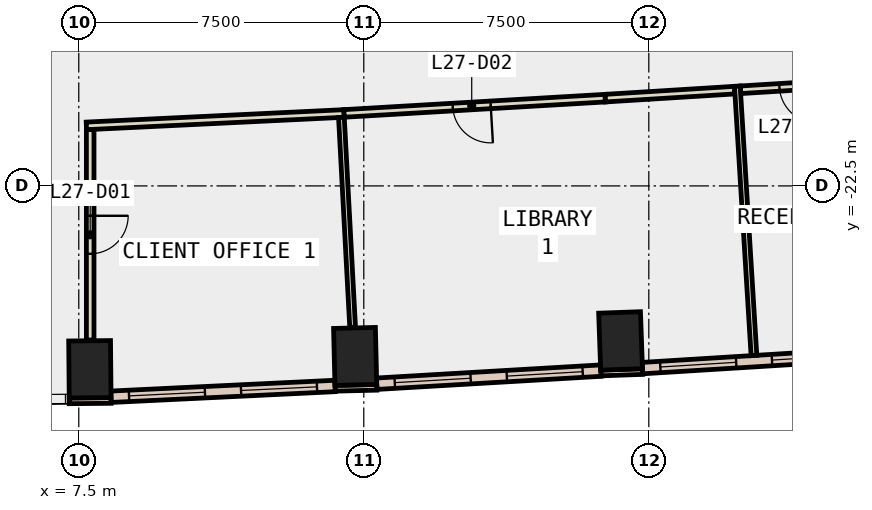
"""IFC4 building model, lengths in metres.
Left out: names, types, materials, properties, quantities, classifications, styles, units other than length and angle.
Written with IfcOpenShell. Run it as: python <this file> out.ifc"""

import sys

from ifc_helpers import new_model, si_unit, direction, frame, frame_2d, origin, origin_2d, place, context, subcontext, project, spatial, rectangle, extrude, element, fill, save


model = new_model("IFC4")
c1 = context("Model", 3, precision=1e-05, world=origin(), true_north=direction((0.0, 1.0)))
c2 = subcontext(c1, "Body", "Model", "MODEL_VIEW")
j1 = project(units=[si_unit("LENGTHUNIT", "METRE"), si_unit("PLANEANGLEUNIT", "RADIAN")], contexts=[c1])
p1 = place(None, origin())
s1 = spatial("IfcSite", under=j1, at=p1, CompositionType="ELEMENT")
p2 = place(p1, origin())
s2 = spatial("IfcBuilding", under=s1, at=p2, CompositionType="ELEMENT")
p3 = place(p2, frame((0.0, 0.0, 124.4)))
s3 = spatial("IfcBuildingStorey", under=s2, at=p3, CompositionType="ELEMENT", Elevation=124.4)
for number, where, z_axis, x_axis in (
    (1, (7.792, -27.325, -0.4), (0.0, 0.0, 1.0), (1.0, 0.009, 0.0)),
    (2, (14.773, -26.987, -0.4), (0.0, 0.0, 1.0), (1.0, 0.024, 0.0)),
    (3, (21.757, -26.579, -0.4), (0.0, 0.0, 1.0), (0.999, 0.035, 0.0)),
):
    element("IfcColumn", number, at=place(p3, frame(where, z_axis=z_axis, x_axis=x_axis)), inside=s3, PredefinedType="COLUMN", context=c2, shape_type="SweptSolid", body=[
        extrude(rectangle(XDim=1.1, YDim=1.5, at=origin_2d()), origin(), (0.0, 0.0, 1.0), 4.2),
    ])
p4 = place(p3, frame((7.249, -28.155, 0.0), z_axis=(0.0, 0.0, 1.0), x_axis=(0.99995860686, 0.009098602504, 0.0)))
e4 = element("IfcWall", 4, at=p4, inside=s3, PredefinedType="STANDARD", context=c2, shape_type="SweptSolid", body=[
    extrude(rectangle(XDim=1.1, YDim=0.15, at=frame_2d((0.55, 0.0))), origin(), (0.0, 0.0, 1.0), 3.8),
])
p5 = place(p3, frame((14.243, -27.825, 0.0), z_axis=(0.0, 0.0, 1.0), x_axis=(0.999723421029, 0.023517683673, 0.0)))
e5 = element("IfcWall", 5, at=p5, inside=s3, PredefinedType="STANDARD", context=c2, shape_type="SweptSolid", body=[
    extrude(rectangle(XDim=1.1, YDim=0.15, at=frame_2d((0.55, 0.0))), origin(), (0.0, 0.0, 1.0), 3.8),
])
p6 = place(p3, frame((21.237, -27.423, 0.0), z_axis=(0.0, 0.0, 1.0), x_axis=(0.999368780235, 0.035525217693, 0.0)))
e6 = element("IfcWall", 6, at=p6, inside=s3, PredefinedType="STANDARD", context=c2, shape_type="SweptSolid", body=[
    extrude(rectangle(XDim=1.1, YDim=0.15, at=frame_2d((0.55, 0.0))), origin(), (0.0, 0.0, 1.0), 3.8),
])
p7 = place(p3, frame((8.347, -28.048, 0.0), z_axis=(0.0, 0.0, 1.0), x_axis=(0.998840459798, 0.048142869367, 0.0)))
e7 = element("IfcWall", 7, at=p7, inside=s3, PredefinedType="STANDARD", context=c2, shape_type="SweptSolid", body=[
    extrude(rectangle(XDim=5.903, YDim=0.3, at=frame_2d((2.951, 0.0))), origin(), (0.0, 0.0, 1.0), 3.8),
])
p8 = place(p7, frame((0.476, 0.0, 0.9)))
e8 = element("IfcOpeningElement", 8, at=p8, cuts=e7, PredefinedType="OPENING", context=c2, shape_type="SweptSolid", body=[
    extrude(rectangle(XDim=2.0, YDim=2.6, at=frame_2d((1.0, 1.3))), frame((0.0, 0.16, 0.0), z_axis=(0.0, -1.0, 0.0), x_axis=(1.0, 0.0, 0.0)), (0.0, 0.0, 1.0), 0.32),
])
p9 = place(p7, frame((3.427, 0.0, 0.9)))
e9 = element("IfcOpeningElement", 9, at=p9, cuts=e7, PredefinedType="OPENING", context=c2, shape_type="SweptSolid", body=[
    extrude(rectangle(XDim=2.0, YDim=2.6, at=frame_2d((1.0, 1.3))), frame((0.0, 0.16, 0.0), z_axis=(0.0, -1.0, 0.0), x_axis=(1.0, 0.0, 0.0)), (0.0, 0.0, 1.0), 0.32),
])
p10 = place(p3, frame((15.34, -27.705, 0.0), z_axis=(0.0, 0.0, 1.0), x_axis=(0.998292147894, 0.058419067546, 0.0)))
e10 = element("IfcWall", 10, at=p10, inside=s3, PredefinedType="STANDARD", context=c2, shape_type="SweptSolid", body=[
    extrude(rectangle(XDim=5.905, YDim=0.3, at=frame_2d((2.953, 0.0))), origin(), (0.0, 0.0, 1.0), 3.8),
])
p11 = place(p10, frame((0.476, 0.0, 0.9)))
e11 = element("IfcOpeningElement", 11, at=p11, cuts=e10, PredefinedType="OPENING", context=c2, shape_type="SweptSolid", body=[
    extrude(rectangle(XDim=2.0, YDim=2.6, at=frame_2d((1.0, 1.3))), frame((0.0, 0.16, 0.0), z_axis=(0.0, -1.0, 0.0), x_axis=(1.0, 0.0, 0.0)), (0.0, 0.0, 1.0), 0.32),
])
p12 = place(p10, frame((3.429, 0.0, 0.9)))
e12 = element("IfcOpeningElement", 12, at=p12, cuts=e10, PredefinedType="OPENING", context=c2, shape_type="SweptSolid", body=[
    extrude(rectangle(XDim=2.0, YDim=2.6, at=frame_2d((1.0, 1.3))), frame((0.0, 0.16, 0.0), z_axis=(0.0, -1.0, 0.0), x_axis=(1.0, 0.0, 0.0)), (0.0, 0.0, 1.0), 0.32),
])
p13 = place(p3, frame((22.332, -27.294, 0.0), z_axis=(0.0, 0.0, 1.0), x_axis=(0.998086636664, 0.061830944626, 0.0)))
e13 = element("IfcWall", 13, at=p13, inside=s3, PredefinedType="STANDARD", context=c2, shape_type="SweptSolid", body=[
    extrude(rectangle(XDim=5.887, YDim=0.3, at=frame_2d((2.944, 0.0))), origin(), (0.0, 0.0, 1.0), 3.8),
])
p14 = place(p13, frame((0.472, 0.0, 0.9)))
e14 = element("IfcOpeningElement", 14, at=p14, cuts=e13, PredefinedType="OPENING", context=c2, shape_type="SweptSolid", body=[
    extrude(rectangle(XDim=2.0, YDim=2.6, at=frame_2d((1.0, 1.3))), frame((0.0, 0.16, 0.0), z_axis=(0.0, -1.0, 0.0), x_axis=(1.0, 0.0, 0.0)), (0.0, 0.0, 1.0), 0.32),
])
p15 = place(p13, frame((3.415, 0.0, 0.9)))
e15 = element("IfcOpeningElement", 15, at=p15, cuts=e13, PredefinedType="OPENING", context=c2, shape_type="SweptSolid", body=[
    extrude(rectangle(XDim=2.0, YDim=2.6, at=frame_2d((1.0, 1.3))), frame((0.0, 0.16, 0.0), z_axis=(0.0, -1.0, 0.0), x_axis=(1.0, 0.0, 0.0)), (0.0, 0.0, 1.0), 0.32),
])
p16 = place(p3, frame((14.481, -20.594, 0.0), z_axis=(0.0, 0.0, 1.0), x_axis=(-0.998839976403, -0.048152897512, 0.0)))
e16 = element("IfcWall", 16, at=p16, inside=s3, PredefinedType="PARTITIONING", context=c2, shape_type="SweptSolid", body=[
    extrude(rectangle(XDim=6.789, YDim=0.2, at=frame_2d((3.395, 0.0))), origin(), (0.0, 0.0, 1.0), 3.8),
])
p17 = place(p3, frame((24.76, -19.98, 0.0), z_axis=(0.0, 0.0, 1.0), x_axis=(-0.998092137917, -0.061742078267, 0.0)))
e17 = element("IfcWall", 17, at=p17, inside=s3, PredefinedType="PARTITIONING", context=c2, shape_type="SweptSolid", body=[
    extrude(rectangle(XDim=3.417, YDim=0.2, at=frame_2d((1.708, 0.0))), origin(), (0.0, 0.0, 1.0), 3.8),
])
p18 = place(p3, frame((21.35, -20.191, 0.0), z_axis=(0.0, 0.0, 1.0), x_axis=(-0.998291094182, -0.058437071087, 0.0)))
e18 = element("IfcWall", 18, at=p18, inside=s3, PredefinedType="PARTITIONING", context=c2, shape_type="SweptSolid", body=[
    extrude(rectangle(XDim=6.881, YDim=0.2, at=frame_2d((3.44, 0.0))), origin(), (0.0, 0.0, 1.0), 3.8),
])
p19 = place(p18, frame((3.016, 0.0, 0.0)))
e19 = element("IfcOpeningElement", 19, at=p19, cuts=e18, PredefinedType="OPENING", context=c2, shape_type="SweptSolid", body=[
    extrude(rectangle(XDim=1.0, YDim=2.1, at=frame_2d((0.5, 1.05))), frame((0.0, 0.11, 0.0), z_axis=(0.0, -1.0, 0.0), x_axis=(1.0, 0.0, 0.0)), (0.0, 0.0, 1.0), 0.22),
])
p20 = place(p3, frame((27.962, -19.782, 0.0), z_axis=(0.0, 0.0, 1.0), x_axis=(-0.998088756763, -0.061796712082, 0.0)))
e20 = element("IfcWall", 20, at=p20, inside=s3, PredefinedType="PARTITIONING", context=c2, shape_type="SweptSolid", body=[
    extrude(rectangle(XDim=3.058, YDim=0.2, at=frame_2d((1.529, 0.0))), origin(), (0.0, 0.0, 1.0), 3.8),
])
p21 = place(p20, frame((1.029, 0.0, 0.0)))
e21 = element("IfcOpeningElement", 21, at=p21, cuts=e20, PredefinedType="OPENING", context=c2, shape_type="SweptSolid", body=[
    extrude(rectangle(XDim=1.0, YDim=2.1, at=frame_2d((0.5, 1.05))), frame((0.0, 0.11, 0.0), z_axis=(0.0, -1.0, 0.0), x_axis=(1.0, 0.0, 0.0)), (0.0, 0.0, 1.0), 0.22),
])
p22 = place(p3, frame((7.8, -21.017, 0.0), z_axis=(0.0, 0.0, 1.0), x_axis=(0.0, -1.0, 0.0)))
e22 = element("IfcWall", 22, at=p22, inside=s3, PredefinedType="PARTITIONING", context=c2, shape_type="SweptSolid", body=[
    extrude(rectangle(XDim=5.538, YDim=0.2, at=frame_2d((2.769, 0.0))), origin(), (0.0, 0.0, 1.0), 3.8),
])
p23 = place(p22, frame((2.269, 0.0, 0.0)))
e23 = element("IfcOpeningElement", 23, at=p23, cuts=e22, PredefinedType="OPENING", context=c2, shape_type="SweptSolid", body=[
    extrude(rectangle(XDim=1.0, YDim=2.1, at=frame_2d((0.5, 1.05))), frame((0.0, 0.11, 0.0), z_axis=(0.0, -1.0, 0.0), x_axis=(1.0, 0.0, 0.0)), (0.0, 0.0, 1.0), 0.22),
])
p24 = place(p3, frame((14.411, -20.697, 0.0), z_axis=(0.0, 0.0, 1.0), x_axis=(0.053386216168, -0.998573939137, 0.0)))
e24 = element("IfcWall", 24, at=p24, inside=s3, PredefinedType="PARTITIONING", context=c2, shape_type="SweptSolid", body=[
    extrude(rectangle(XDim=5.529, YDim=0.15, at=frame_2d((2.764, 0.0))), origin(), (0.0, 0.0, 1.0), 3.8),
])
p25 = place(p3, frame((24.829, -19.876, 0.0), z_axis=(0.0, 0.0, 1.0), x_axis=(0.061693175316, -0.998095161856, 0.0)))
e25 = element("IfcWall", 25, at=p25, inside=s3, PredefinedType="PARTITIONING", context=c2, shape_type="SweptSolid", body=[
    extrude(rectangle(XDim=7.099, YDim=0.15, at=frame_2d((3.55, 0.0))), origin(), (0.0, 0.0, 1.0), 3.8),
])
p26 = place(p8, origin())
e26 = element("IfcWindow", 26, at=p26, inside=s3, PartitioningType="SINGLE_PANEL", PredefinedType="WINDOW", context=c2, shape_type="SweptSolid", body=[
    extrude(rectangle(XDim=2.0, YDim=2.6, at=frame_2d((1.0, 1.3))), frame((0.0, 0.03, 0.0), z_axis=(0.0, -1.0, 0.0), x_axis=(1.0, 0.0, 0.0)), (0.0, 0.0, 1.0), 0.06),
])
fill(e8, e26)
p27 = place(p9, origin())
e27 = element("IfcWindow", 27, at=p27, inside=s3, PartitioningType="SINGLE_PANEL", PredefinedType="WINDOW", context=c2, shape_type="SweptSolid", body=[
    extrude(rectangle(XDim=2.0, YDim=2.6, at=frame_2d((1.0, 1.3))), frame((0.0, 0.03, 0.0), z_axis=(0.0, -1.0, 0.0), x_axis=(1.0, 0.0, 0.0)), (0.0, 0.0, 1.0), 0.06),
])
fill(e9, e27)
p28 = place(p11, origin())
e28 = element("IfcWindow", 28, at=p28, inside=s3, PartitioningType="SINGLE_PANEL", PredefinedType="WINDOW", context=c2, shape_type="SweptSolid", body=[
    extrude(rectangle(XDim=2.0, YDim=2.6, at=frame_2d((1.0, 1.3))), frame((0.0, 0.03, 0.0), z_axis=(0.0, -1.0, 0.0), x_axis=(1.0, 0.0, 0.0)), (0.0, 0.0, 1.0), 0.06),
])
fill(e11, e28)
p29 = place(p12, origin())
e29 = element("IfcWindow", 29, at=p29, inside=s3, PartitioningType="SINGLE_PANEL", PredefinedType="WINDOW", context=c2, shape_type="SweptSolid", body=[
    extrude(rectangle(XDim=2.0, YDim=2.6, at=frame_2d((1.0, 1.3))), frame((0.0, 0.03, 0.0), z_axis=(0.0, -1.0, 0.0), x_axis=(1.0, 0.0, 0.0)), (0.0, 0.0, 1.0), 0.06),
])
fill(e12, e29)
p30 = place(p14, origin())
e30 = element("IfcWindow", 30, at=p30, inside=s3, PartitioningType="SINGLE_PANEL", PredefinedType="WINDOW", context=c2, shape_type="SweptSolid", body=[
    extrude(rectangle(XDim=2.0, YDim=2.6, at=frame_2d((1.0, 1.3))), frame((0.0, 0.03, 0.0), z_axis=(0.0, -1.0, 0.0), x_axis=(1.0, 0.0, 0.0)), (0.0, 0.0, 1.0), 0.06),
])
fill(e14, e30)
p31 = place(p15, origin())
e31 = element("IfcWindow", 31, at=p31, inside=s3, PartitioningType="SINGLE_PANEL", PredefinedType="WINDOW", context=c2, shape_type="SweptSolid", body=[
    extrude(rectangle(XDim=2.0, YDim=2.6, at=frame_2d((1.0, 1.3))), frame((0.0, 0.03, 0.0), z_axis=(0.0, -1.0, 0.0), x_axis=(1.0, 0.0, 0.0)), (0.0, 0.0, 1.0), 0.06),
])
fill(e15, e31)
p32 = place(p23, origin())
e32 = element("IfcDoor", 32, at=p32, inside=s3, OperationType="SINGLE_SWING_LEFT", PredefinedType="DOOR", context=c2, shape_type="SweptSolid", body=[
    extrude(rectangle(XDim=1.0, YDim=2.1, at=frame_2d((0.5, 1.05))), frame((0.0, 0.025, 0.0), z_axis=(0.0, -1.0, 0.0), x_axis=(1.0, 0.0, 0.0)), (0.0, 0.0, 1.0), 0.05),
])
fill(e23, e32)
p33 = place(p19, origin())
e33 = element("IfcDoor", 33, at=p33, inside=s3, OperationType="SINGLE_SWING_RIGHT", PredefinedType="DOOR", context=c2, shape_type="SweptSolid", body=[
    extrude(rectangle(XDim=1.0, YDim=2.1, at=frame_2d((0.5, 1.05))), frame((0.0, 0.025, 0.0), z_axis=(0.0, -1.0, 0.0), x_axis=(1.0, 0.0, 0.0)), (0.0, 0.0, 1.0), 0.05),
])
fill(e19, e33)
p34 = place(p21, origin())
e34 = element("IfcDoor", 34, at=p34, inside=s3, OperationType="SINGLE_SWING_RIGHT", PredefinedType="DOOR", context=c2, shape_type="SweptSolid", body=[
    extrude(rectangle(XDim=1.0, YDim=2.1, at=frame_2d((0.5, 1.05))), frame((0.0, 0.025, 0.0), z_axis=(0.0, -1.0, 0.0), x_axis=(1.0, 0.0, 0.0)), (0.0, 0.0, 1.0), 0.05),
])
fill(e21, e34)
save(model, sys.argv[1])
